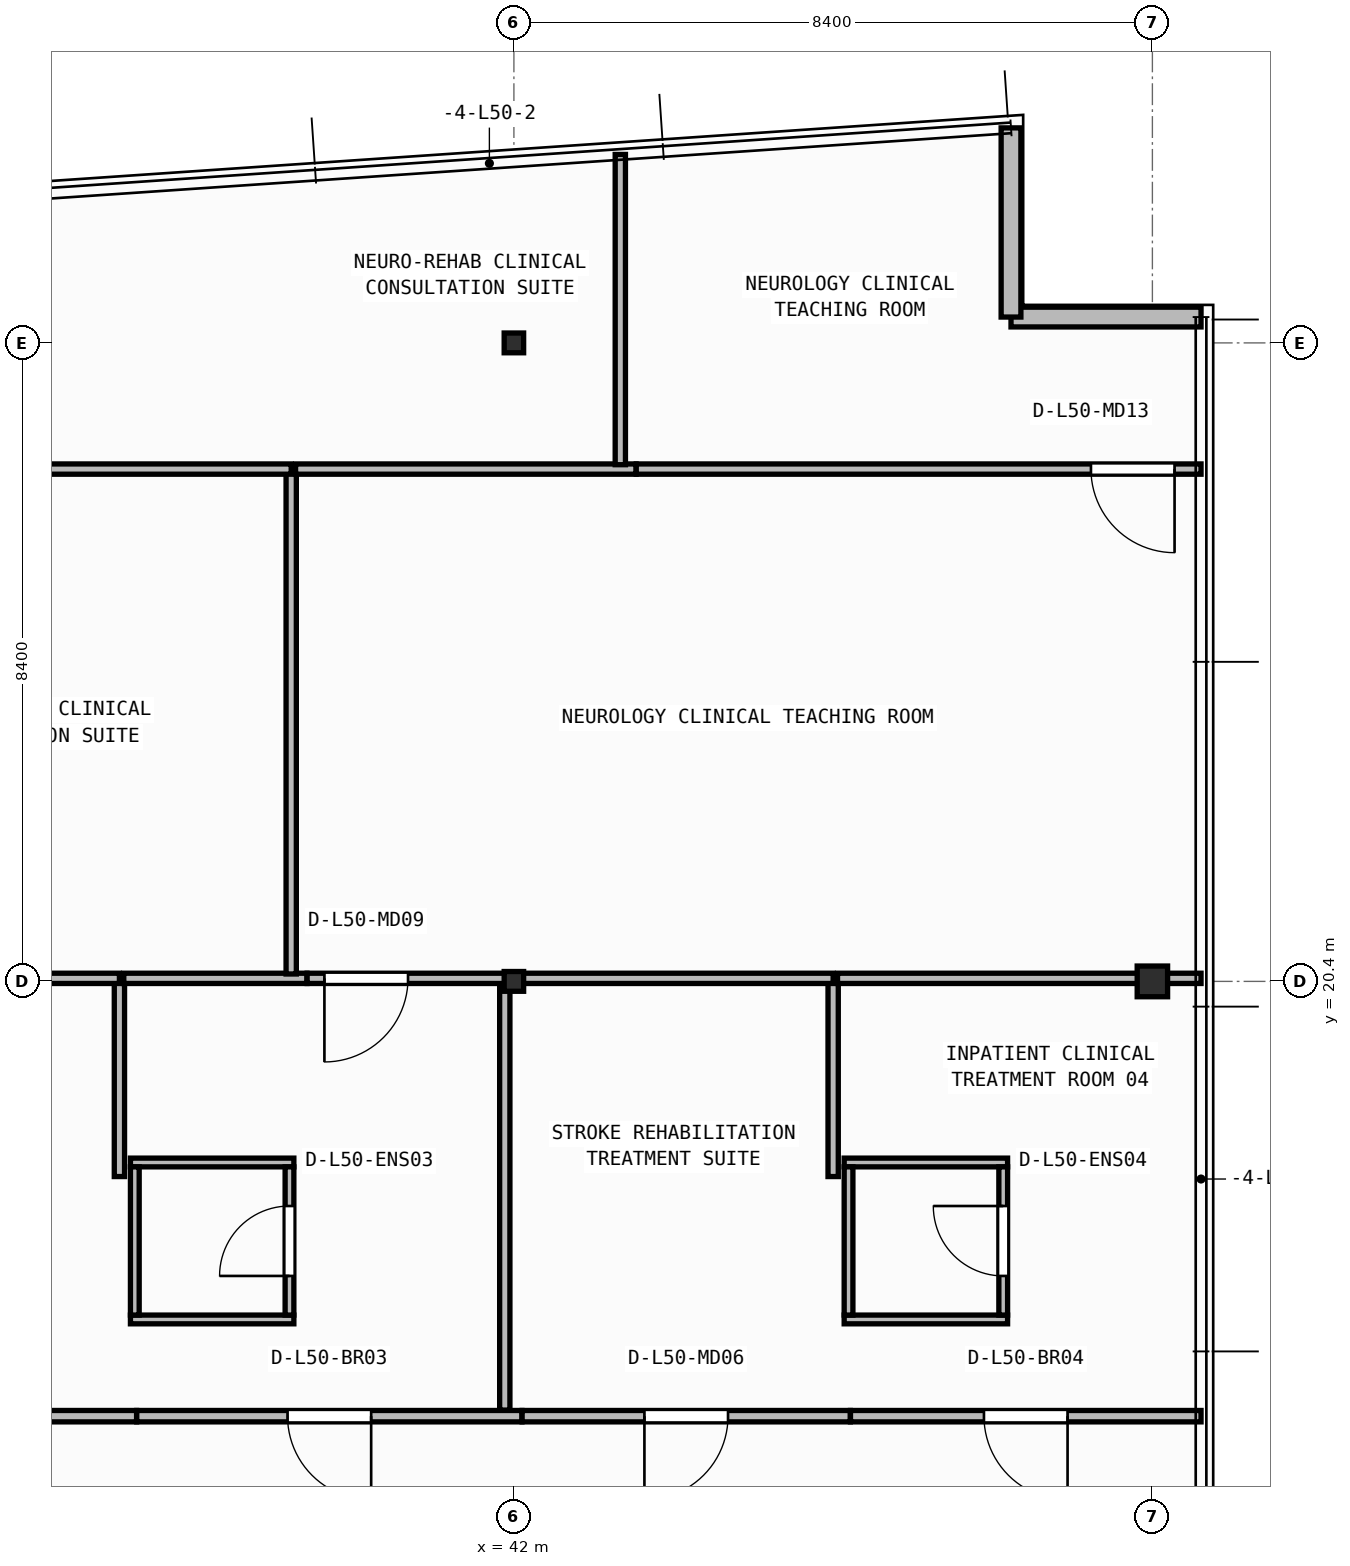
"""IFC4 building model, lengths in metres.
Left out: names, types, materials, properties, quantities, classifications, styles, units other than length and angle.
Written with IfcOpenShell. Run it as: python <this file> out.ifc"""

import sys

from ifc_helpers import new_model, si_unit, direction, frame, frame_2d, origin, origin_2d, place, context, subcontext, project, spatial, rectangle, i_section, extrude, element, fill, save


model = new_model("IFC4")
c1 = context("Model", 3, precision=1e-05, world=origin(), true_north=direction((0.0, 1.0)))
c2 = subcontext(c1, "Body", "Model", "MODEL_VIEW")
j1 = project(units=[si_unit("LENGTHUNIT", "METRE"), si_unit("PLANEANGLEUNIT", "RADIAN")], contexts=[c1])
p1 = place(None, origin())
s1 = spatial("IfcSite", under=j1, at=p1, CompositionType="ELEMENT")
p2 = place(p1, origin())
s2 = spatial("IfcBuilding", under=s1, at=p2, CompositionType="ELEMENT")
p3 = place(p2, frame((0.0, 0.0, 203.95)))
s3 = spatial("IfcBuildingStorey", under=s2, at=p3, CompositionType="ELEMENT", Elevation=203.95)
p4 = place(p3, frame((42.0, 20.4, 0.0), z_axis=(0.0, 0.0, 1.0), x_axis=(1.0, 0.0, 0.0)))
e1 = element("IfcColumn", 1, at=p4, inside=s3, PredefinedType="COLUMN", context=c2, shape_type="SweptSolid", body=[
    extrude(i_section(OverallWidth=0.256, OverallDepth=0.26, WebThickness=0.01, FlangeThickness=0.017, FilletRadius=0.013, at=origin_2d()), origin(), (0.0, 0.0, 1.0), 3.95),
])
p5 = place(p3, frame((50.4, 20.4, 0.0), z_axis=(0.0, 0.0, 1.0), x_axis=(1.0, 0.0, 0.0)))
e2 = element("IfcColumn", 2, at=p5, inside=s3, PredefinedType="COLUMN", context=c2, shape_type="SweptSolid", body=[
    extrude(i_section(OverallWidth=0.4, OverallDepth=0.404, WebThickness=0.02, FlangeThickness=0.032, at=origin_2d()), origin(), (0.0, 0.0, 1.0), 3.95),
])
p6 = place(p3, frame((42.0, 28.8, 0.0), z_axis=(0.0, 0.0, 1.0), x_axis=(1.0, 0.0, 0.0)))
e3 = element("IfcColumn", 3, at=p6, inside=s3, PredefinedType="COLUMN", context=c2, shape_type="SweptSolid", body=[
    extrude(i_section(OverallWidth=0.256, OverallDepth=0.26, WebThickness=0.01, FlangeThickness=0.017, FilletRadius=0.013, at=origin_2d()), origin(), (0.0, 0.0, 1.0), 3.95),
])
p7 = place(p3, frame((51.04, 29.14, 0.0), z_axis=(0.0, 0.0, 1.0), x_axis=(-1.0, 0.0, 0.0)))
e4 = element("IfcWall", 4, at=p7, inside=s3, PredefinedType="STANDARD", context=c2, shape_type="SweptSolid", body=[
    extrude(rectangle(XDim=2.5, YDim=0.26, at=frame_2d((1.25, 0.0))), origin(), (0.0, 0.0, 1.0), 3.71),
])
p8 = place(p3, frame((48.54, 29.14, 0.0), z_axis=(0.0, 0.0, 1.0), x_axis=(0.0, 1.0, 0.0)))
e5 = element("IfcWall", 5, at=p8, inside=s3, PredefinedType="STANDARD", context=c2, shape_type="SweptSolid", body=[
    extrude(rectangle(XDim=2.489, YDim=0.26, at=frame_2d((1.245, 0.0))), origin(), (0.0, 0.0, 1.0), 3.71),
])
p9 = place(p3, frame((36.955, 15.952, 0.0), z_axis=(0.0, 0.0, 1.0), x_axis=(1.0, 0.0, 0.0)))
e6 = element("IfcWall", 6, at=p9, inside=s3, PredefinedType="PARTITIONING", context=c2, shape_type="SweptSolid", body=[
    extrude(rectangle(XDim=2.15, YDim=0.115, at=frame_2d((1.075, 0.0))), origin(), (0.0, 0.0, 1.0), 3.381),
])
p10 = place(p3, frame((36.955, 18.018, 0.0), z_axis=(0.0, 0.0, 1.0), x_axis=(1.0, 0.0, 0.0)))
e7 = element("IfcWall", 7, at=p10, inside=s3, PredefinedType="PARTITIONING", context=c2, shape_type="SweptSolid", body=[
    extrude(rectangle(XDim=2.15, YDim=0.115, at=frame_2d((1.075, 0.0))), origin(), (0.0, 0.0, 1.0), 3.71),
])
p11 = place(p3, frame((37.012, 16.01, 0.0), z_axis=(0.0, 0.0, 1.0), x_axis=(0.0, 1.0, 0.0)))
e8 = element("IfcWall", 8, at=p11, inside=s3, PredefinedType="PARTITIONING", context=c2, shape_type="SweptSolid", body=[
    extrude(rectangle(XDim=1.95, YDim=0.115, at=frame_2d((0.975, 0.0))), origin(), (0.0, 0.0, 1.0), 3.71),
])
p12 = place(p3, frame((39.048, 16.01, 0.0), z_axis=(0.0, 0.0, 1.0), x_axis=(0.0, 1.0, 0.0)))
e9 = element("IfcWall", 9, at=p12, inside=s3, PredefinedType="PARTITIONING", context=c2, shape_type="SweptSolid", body=[
    extrude(rectangle(XDim=1.95, YDim=0.115, at=frame_2d((0.975, 0.0))), origin(), (0.0, 0.0, 1.0), 3.71),
])
p13 = place(p12, frame((0.515, 0.0, 0.0)))
e10 = element("IfcOpeningElement", 10, at=p13, cuts=e9, PredefinedType="OPENING", context=c2, shape_type="SweptSolid", body=[
    extrude(rectangle(XDim=0.92, YDim=2.1, at=frame_2d((0.46, 1.05))), frame((0.0, 0.067, 0.0), z_axis=(0.0, -1.0, 0.0), x_axis=(1.0, 0.0, 0.0)), (0.0, 0.0, 1.0), 0.135),
])
p14 = place(p3, frame((46.345, 15.952, 0.0), z_axis=(0.0, 0.0, 1.0), x_axis=(1.0, 0.0, 0.0)))
e11 = element("IfcWall", 11, at=p14, inside=s3, PredefinedType="PARTITIONING", context=c2, shape_type="SweptSolid", body=[
    extrude(rectangle(XDim=2.15, YDim=0.115, at=frame_2d((1.075, 0.0))), origin(), (0.0, 0.0, 1.0), 3.381),
])
p15 = place(p3, frame((46.345, 18.018, 0.0), z_axis=(0.0, 0.0, 1.0), x_axis=(1.0, 0.0, 0.0)))
e12 = element("IfcWall", 12, at=p15, inside=s3, PredefinedType="PARTITIONING", context=c2, shape_type="SweptSolid", body=[
    extrude(rectangle(XDim=2.15, YDim=0.115, at=frame_2d((1.075, 0.0))), origin(), (0.0, 0.0, 1.0), 3.71),
])
p16 = place(p3, frame((46.403, 16.01, 0.0), z_axis=(0.0, 0.0, 1.0), x_axis=(0.0, 1.0, 0.0)))
e13 = element("IfcWall", 13, at=p16, inside=s3, PredefinedType="PARTITIONING", context=c2, shape_type="SweptSolid", body=[
    extrude(rectangle(XDim=1.95, YDim=0.115, at=frame_2d((0.975, 0.0))), origin(), (0.0, 0.0, 1.0), 3.71),
])
p17 = place(p3, frame((48.438, 16.01, 0.0), z_axis=(0.0, 0.0, 1.0), x_axis=(0.0, 1.0, 0.0)))
e14 = element("IfcWall", 14, at=p17, inside=s3, PredefinedType="PARTITIONING", context=c2, shape_type="SweptSolid", body=[
    extrude(rectangle(XDim=1.95, YDim=0.115, at=frame_2d((0.975, 0.0))), origin(), (0.0, 0.0, 1.0), 3.71),
])
p18 = place(p17, frame((0.515, 0.0, 0.0)))
e15 = element("IfcOpeningElement", 15, at=p18, cuts=e14, PredefinedType="OPENING", context=c2, shape_type="SweptSolid", body=[
    extrude(rectangle(XDim=0.92, YDim=2.1, at=frame_2d((0.46, 1.05))), frame((0.0, 0.067, 0.0), z_axis=(0.0, -1.0, 0.0), x_axis=(1.0, 0.0, 0.0)), (0.0, 0.0, 1.0), 0.135),
])
p19 = place(p3, frame((37.036, 14.68, 0.0), z_axis=(0.0, 0.0, 1.0), x_axis=(-1.0, 0.0, 0.0)))
e16 = element("IfcWall", 16, at=p19, inside=s3, PredefinedType="PARTITIONING", context=c2, shape_type="SweptSolid", body=[
    extrude(rectangle(XDim=4.688, YDim=0.15, at=frame_2d((2.344, 0.0))), origin(), (0.0, 0.0, 1.0), 3.71),
])
p20 = place(p19, frame((1.794, 0.0, 0.0)))
e17 = element("IfcOpeningElement", 17, at=p20, cuts=e16, PredefinedType="OPENING", context=c2, shape_type="SweptSolid", body=[
    extrude(rectangle(XDim=1.1, YDim=2.1, at=frame_2d((0.55, 1.05))), frame((0.0, 0.085, 0.0), z_axis=(0.0, -1.0, 0.0), x_axis=(1.0, 0.0, 0.0)), (0.0, 0.0, 1.0), 0.17),
])
p21 = place(p3, frame((42.106, 14.68, 0.0), z_axis=(0.0, 0.0, 1.0), x_axis=(-1.0, 0.0, 0.0)))
e18 = element("IfcWall", 18, at=p21, inside=s3, PredefinedType="PARTITIONING", context=c2, shape_type="SweptSolid", body=[
    extrude(rectangle(XDim=5.068, YDim=0.15, at=frame_2d((2.534, 0.0))), origin(), (0.0, 0.0, 1.0), 3.71),
])
p22 = place(p21, frame((1.984, 0.0, 0.0)))
e19 = element("IfcOpeningElement", 19, at=p22, cuts=e18, PredefinedType="OPENING", context=c2, shape_type="SweptSolid", body=[
    extrude(rectangle(XDim=1.1, YDim=2.1, at=frame_2d((0.55, 1.05))), frame((0.0, 0.085, 0.0), z_axis=(0.0, -1.0, 0.0), x_axis=(1.0, 0.0, 0.0)), (0.0, 0.0, 1.0), 0.17),
])
p23 = place(p3, frame((46.426, 14.68, 0.0), z_axis=(0.0, 0.0, 1.0), x_axis=(-1.0, 0.0, 0.0)))
e20 = element("IfcWall", 20, at=p23, inside=s3, PredefinedType="PARTITIONING", context=c2, shape_type="SweptSolid", body=[
    extrude(rectangle(XDim=4.318, YDim=0.15, at=frame_2d((2.159, 0.0))), origin(), (0.0, 0.0, 1.0), 3.71),
])
p24 = place(p23, frame((1.609, 0.0, 0.0)))
e21 = element("IfcOpeningElement", 21, at=p24, cuts=e20, PredefinedType="OPENING", context=c2, shape_type="SweptSolid", body=[
    extrude(rectangle(XDim=1.1, YDim=2.1, at=frame_2d((0.55, 1.05))), frame((0.0, 0.085, 0.0), z_axis=(0.0, -1.0, 0.0), x_axis=(1.0, 0.0, 0.0)), (0.0, 0.0, 1.0), 0.17),
])
p25 = place(p3, frame((51.04, 14.68, 0.0), z_axis=(0.0, 0.0, 1.0), x_axis=(-1.0, 0.0, 0.0)))
e22 = element("IfcWall", 22, at=p25, inside=s3, PredefinedType="PARTITIONING", context=c2, shape_type="SweptSolid", body=[
    extrude(rectangle(XDim=4.612, YDim=0.15, at=frame_2d((2.306, 0.0))), origin(), (0.0, 0.0, 1.0), 3.71),
])
p26 = place(p25, frame((1.756, 0.0, 0.0)))
e23 = element("IfcOpeningElement", 23, at=p26, cuts=e22, PredefinedType="OPENING", context=c2, shape_type="SweptSolid", body=[
    extrude(rectangle(XDim=1.1, YDim=2.1, at=frame_2d((0.55, 1.05))), frame((0.0, 0.085, 0.0), z_axis=(0.0, -1.0, 0.0), x_axis=(1.0, 0.0, 0.0)), (0.0, 0.0, 1.0), 0.17),
])
p27 = place(p3, frame((36.81, 17.833, 0.0), z_axis=(0.0, 0.0, 1.0), x_axis=(0.0, 1.0, 0.0)))
e24 = element("IfcWall", 24, at=p27, inside=s3, PredefinedType="PARTITIONING", context=c2, shape_type="SweptSolid", body=[
    extrude(rectangle(XDim=2.607, YDim=0.135, at=frame_2d((1.304, 0.0))), origin(), (0.0, 0.0, 1.0), 3.71),
])
p28 = place(p3, frame((36.81, 20.44, 0.0), z_axis=(0.0, 0.0, 1.0), x_axis=(-1.0, 0.0, 0.0)))
e25 = element("IfcWall", 25, at=p28, inside=s3, PredefinedType="PARTITIONING", context=c2, shape_type="SweptSolid", body=[
    extrude(rectangle(XDim=4.633, YDim=0.135, at=frame_2d((2.316, 0.0))), origin(), (0.0, 0.0, 1.0), 3.152),
])
p29 = place(p3, frame((41.88, 14.76, 0.0), z_axis=(0.0, 0.0, 1.0), x_axis=(0.0, 1.0, 0.0)))
e26 = element("IfcWall", 26, at=p29, inside=s3, PredefinedType="PARTITIONING", context=c2, shape_type="SweptSolid", body=[
    extrude(rectangle(XDim=5.68, YDim=0.135, at=frame_2d((2.84, 0.0))), origin(), (0.0, 0.0, 1.0), 3.157),
])
p30 = place(p3, frame((39.278, 20.44, 0.0), z_axis=(0.0, 0.0, 1.0), x_axis=(-1.0, 0.0, 0.0)))
e27 = element("IfcWall", 27, at=p30, inside=s3, PredefinedType="PARTITIONING", context=c2, shape_type="SweptSolid", body=[
    extrude(rectangle(XDim=2.41, YDim=0.135, at=frame_2d((1.205, 0.0))), origin(), (0.0, 0.0, 1.0), 3.152),
])
p31 = place(p3, frame((41.88, 20.44, 0.0), z_axis=(0.0, 0.0, 1.0), x_axis=(-1.0, 0.0, 0.0)))
e28 = element("IfcWall", 28, at=p31, inside=s3, PredefinedType="PARTITIONING", context=c2, shape_type="SweptSolid", body=[
    extrude(rectangle(XDim=2.6, YDim=0.135, at=frame_2d((1.3, 0.0))), origin(), (0.0, 0.0, 1.0), 3.152),
])
p32 = place(p31, frame((1.273, 0.0, 0.0)))
e29 = element("IfcOpeningElement", 29, at=p32, cuts=e28, PredefinedType="OPENING", context=c2, shape_type="SweptSolid", body=[
    extrude(rectangle(XDim=1.1, YDim=2.1, at=frame_2d((0.55, 1.05))), frame((0.0, 0.077, 0.0), z_axis=(0.0, -1.0, 0.0), x_axis=(1.0, 0.0, 0.0)), (0.0, 0.0, 1.0), 0.155),
])
p33 = place(p3, frame((46.2, 17.833, 0.0), z_axis=(0.0, 0.0, 1.0), x_axis=(0.0, 1.0, 0.0)))
e30 = element("IfcWall", 30, at=p33, inside=s3, PredefinedType="PARTITIONING", context=c2, shape_type="SweptSolid", body=[
    extrude(rectangle(XDim=2.607, YDim=0.135, at=frame_2d((1.304, 0.0))), origin(), (0.0, 0.0, 1.0), 3.71),
])
p34 = place(p3, frame((46.2, 20.44, 0.0), z_axis=(0.0, 0.0, 1.0), x_axis=(-1.0, 0.0, 0.0)))
e31 = element("IfcWall", 31, at=p34, inside=s3, PredefinedType="PARTITIONING", context=c2, shape_type="SweptSolid", body=[
    extrude(rectangle(XDim=4.262, YDim=0.135, at=frame_2d((2.131, 0.0))), origin(), (0.0, 0.0, 1.0), 3.152),
])
p35 = place(p3, frame((51.04, 20.44, 0.0), z_axis=(0.0, 0.0, 1.0), x_axis=(-1.0, 0.0, 0.0)))
e32 = element("IfcWall", 32, at=p35, inside=s3, PredefinedType="PARTITIONING", context=c2, shape_type="SweptSolid", body=[
    extrude(rectangle(XDim=4.782, YDim=0.135, at=frame_2d((2.391, 0.0))), origin(), (0.0, 0.0, 1.0), 3.152),
])
p36 = place(p3, frame((39.07, 20.498, 0.0), z_axis=(0.0, 0.0, 1.0), x_axis=(0.0, 1.0, 0.0)))
e33 = element("IfcWall", 33, at=p36, inside=s3, PredefinedType="PARTITIONING", context=c2, shape_type="SweptSolid", body=[
    extrude(rectangle(XDim=6.642, YDim=0.135, at=frame_2d((3.321, 0.0))), origin(), (0.0, 0.0, 1.0), 3.71),
])
p37 = place(p3, frame((39.07, 27.14, 0.0), z_axis=(0.0, 0.0, 1.0), x_axis=(-1.0, 0.0, 0.0)))
e34 = element("IfcWall", 34, at=p37, inside=s3, PredefinedType="PARTITIONING", context=c2, shape_type="SweptSolid", body=[
    extrude(rectangle(XDim=9.083, YDim=0.135, at=frame_2d((4.541, 0.0))), origin(), (0.0, 0.0, 1.0), 3.71),
])
p38 = place(p3, frame((43.607, 27.14, 0.0), z_axis=(0.0, 0.0, 1.0), x_axis=(-1.0, 0.0, 0.0)))
e35 = element("IfcWall", 35, at=p38, inside=s3, PredefinedType="PARTITIONING", context=c2, shape_type="SweptSolid", body=[
    extrude(rectangle(XDim=4.48, YDim=0.135, at=frame_2d((2.24, 0.0))), origin(), (0.0, 0.0, 1.0), 3.71),
])
p39 = place(p3, frame((51.04, 27.14, 0.0), z_axis=(0.0, 0.0, 1.0), x_axis=(-1.0, 0.0, 0.0)))
e36 = element("IfcWall", 36, at=p39, inside=s3, PredefinedType="PARTITIONING", context=c2, shape_type="SweptSolid", body=[
    extrude(rectangle(XDim=7.43, YDim=0.135, at=frame_2d((3.715, 0.0))), origin(), (0.0, 0.0, 1.0), 3.71),
])
p40 = place(p39, frame((0.348, 0.0, 0.0)))
e37 = element("IfcOpeningElement", 37, at=p40, cuts=e36, PredefinedType="OPENING", context=c2, shape_type="SweptSolid", body=[
    extrude(rectangle(XDim=1.1, YDim=2.1, at=frame_2d((0.55, 1.05))), frame((0.0, 0.077, 0.0), z_axis=(0.0, -1.0, 0.0), x_axis=(1.0, 0.0, 0.0)), (0.0, 0.0, 1.0), 0.155),
])
p41 = place(p3, frame((43.4, 27.198, 0.0), z_axis=(0.0, 0.0, 1.0), x_axis=(0.0, 1.0, 0.0)))
e38 = element("IfcWall", 38, at=p41, inside=s3, PredefinedType="PARTITIONING", context=c2, shape_type="SweptSolid", body=[
    extrude(rectangle(XDim=4.082, YDim=0.135, at=frame_2d((2.041, 0.0))), origin(), (0.0, 0.0, 1.0), 3.71),
])
p42 = place(p13, origin())
e39 = element("IfcDoor", 39, at=p42, inside=s3, OperationType="SINGLE_SWING_LEFT", PredefinedType="DOOR", context=c2, shape_type="SweptSolid", body=[
    extrude(rectangle(XDim=0.92, YDim=2.1, at=frame_2d((0.46, 1.05))), frame((0.0, 0.025, 0.0), z_axis=(0.0, -1.0, 0.0), x_axis=(1.0, 0.0, 0.0)), (0.0, 0.0, 1.0), 0.05),
])
fill(e10, e39)
p43 = place(p18, origin())
e40 = element("IfcDoor", 40, at=p43, inside=s3, OperationType="SINGLE_SWING_RIGHT", PredefinedType="DOOR", context=c2, shape_type="SweptSolid", body=[
    extrude(rectangle(XDim=0.92, YDim=2.1, at=frame_2d((0.46, 1.05))), frame((0.0, 0.025, 0.0), z_axis=(0.0, -1.0, 0.0), x_axis=(1.0, 0.0, 0.0)), (0.0, 0.0, 1.0), 0.05),
])
fill(e15, e40)
p44 = place(p22, origin())
e41 = element("IfcDoor", 41, at=p44, inside=s3, OperationType="SINGLE_SWING_LEFT", PredefinedType="DOOR", context=c2, shape_type="SweptSolid", body=[
    extrude(rectangle(XDim=1.1, YDim=2.1, at=frame_2d((0.55, 1.05))), frame((0.0, 0.025, 0.0), z_axis=(0.0, -1.0, 0.0), x_axis=(1.0, 0.0, 0.0)), (0.0, 0.0, 1.0), 0.05),
])
fill(e19, e41)
p45 = place(p24, origin())
e42 = element("IfcDoor", 42, at=p45, inside=s3, OperationType="SINGLE_SWING_RIGHT", PredefinedType="DOOR", context=c2, shape_type="SweptSolid", body=[
    extrude(rectangle(XDim=1.1, YDim=2.1, at=frame_2d((0.55, 1.05))), frame((0.0, 0.025, 0.0), z_axis=(0.0, -1.0, 0.0), x_axis=(1.0, 0.0, 0.0)), (0.0, 0.0, 1.0), 0.05),
])
fill(e21, e42)
p46 = place(p26, origin())
e43 = element("IfcDoor", 43, at=p46, inside=s3, OperationType="SINGLE_SWING_LEFT", PredefinedType="DOOR", context=c2, shape_type="SweptSolid", body=[
    extrude(rectangle(XDim=1.1, YDim=2.1, at=frame_2d((0.55, 1.05))), frame((0.0, 0.025, 0.0), z_axis=(0.0, -1.0, 0.0), x_axis=(1.0, 0.0, 0.0)), (0.0, 0.0, 1.0), 0.05),
])
fill(e23, e43)
p47 = place(p32, origin())
e44 = element("IfcDoor", 44, at=p47, inside=s3, OperationType="SINGLE_SWING_RIGHT", PredefinedType="DOOR", context=c2, shape_type="SweptSolid", body=[
    extrude(rectangle(XDim=1.1, YDim=2.1, at=frame_2d((0.55, 1.05))), frame((0.0, 0.025, 0.0), z_axis=(0.0, -1.0, 0.0), x_axis=(1.0, 0.0, 0.0)), (0.0, 0.0, 1.0), 0.05),
])
fill(e29, e44)
p48 = place(p40, origin())
e45 = element("IfcDoor", 45, at=p48, inside=s3, OperationType="SINGLE_SWING_LEFT", PredefinedType="DOOR", context=c2, shape_type="SweptSolid", body=[
    extrude(rectangle(XDim=1.1, YDim=2.1, at=frame_2d((0.55, 1.05))), frame((0.0, 0.025, 0.0), z_axis=(0.0, -1.0, 0.0), x_axis=(1.0, 0.0, 0.0)), (0.0, 0.0, 1.0), 0.05),
])
fill(e37, e45)
save(model, sys.argv[1])
